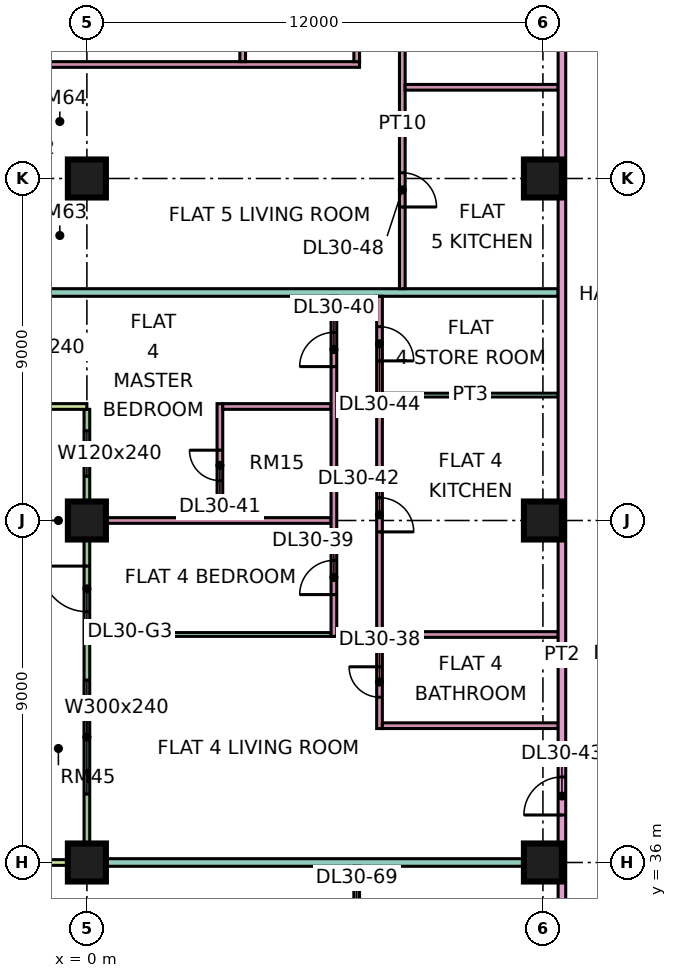
"""IFC4 building model, lengths in metres.
Left out: names, types, materials, properties, quantities, classifications, styles, units other than length and angle.
Written with IfcOpenShell. Run it as: python <this file> out.ifc"""

import sys

from ifc_helpers import new_model, si_unit, direction, frame, frame_2d, origin, origin_2d, place, context, subcontext, project, spatial, rectangle, extrude, element, fill, save


model = new_model("IFC4")
c1 = context("Model", 3, precision=1e-05, world=origin(), true_north=direction((0.0, 1.0)))
c2 = subcontext(c1, "Body", "Model", "MODEL_VIEW")
j1 = project(units=[si_unit("LENGTHUNIT", "METRE"), si_unit("PLANEANGLEUNIT", "RADIAN")], contexts=[c1])
p1 = place(None, origin())
s1 = spatial("IfcSite", under=j1, at=p1, CompositionType="ELEMENT")
p2 = place(p1, origin())
s2 = spatial("IfcBuilding", under=s1, at=p2, CompositionType="ELEMENT")
p3 = place(p2, frame((0.0, 0.0, 129.4)))
s3 = spatial("IfcBuildingStorey", under=s2, at=p3, CompositionType="ELEMENT", Elevation=129.4)
p4 = place(p3, frame((0.0, 36.0, 0.0), z_axis=(0.0, 0.0, 1.0), x_axis=(1.0, 0.0, 0.0)))
e1 = element("IfcColumn", 1, at=p4, inside=s3, PredefinedType="COLUMN", context=c2, shape_type="SweptSolid", body=[
    extrude(rectangle(XDim=1.0, YDim=1.0, at=origin_2d()), origin(), (0.0, 0.0, 1.0), 3.75),
])
for number, where, z_axis, x_axis in (
    (2, (0.0, 45.0, 0.0), (0.0, 0.0, 1.0), (1.0, 0.0, 0.0)),
    (3, (0.0, 54.0, 0.0), (0.0, 0.0, 1.0), (1.0, 0.0, 0.0)),
    (4, (12.0, 36.0, 0.0), (0.0, 0.0, 1.0), (1.0, 0.0, 0.0)),
    (5, (12.0, 45.0, 0.0), (0.0, 0.0, 1.0), (1.0, 0.0, 0.0)),
    (6, (12.0, 54.0, 0.0), (0.0, 0.0, 1.0), (1.0, 0.0, 0.0)),
):
    element("IfcColumn", number, at=place(p3, frame(where, z_axis=z_axis, x_axis=x_axis)), inside=s3, PredefinedType="COLUMN", context=c2, shape_type="SweptSolid", body=[
        extrude(rectangle(XDim=1.0, YDim=1.0, at=origin_2d()), origin(), (0.0, 0.0, 1.0), 3.75),
    ])
p5 = place(p3, frame((0.0, 47.925, 0.0), z_axis=(0.0, 0.0, 1.0), x_axis=(0.0, -1.0, 0.0)))
e7 = element("IfcWall", 7, at=p5, inside=s3, PredefinedType="SOLIDWALL", context=c2, shape_type="SweptSolid", body=[
    extrude(rectangle(XDim=11.85, YDim=0.15, at=frame_2d((5.925, 0.0))), origin(), (0.0, 0.0, 1.0), 3.35),
])
p6 = place(p5, frame((0.562, 0.0, 0.45)))
e8 = element("IfcOpeningElement", 8, at=p6, cuts=e7, PredefinedType="OPENING", context=c2, shape_type="SweptSolid", body=[
    extrude(rectangle(XDim=1.2, YDim=2.4, at=frame_2d((0.6, 1.2))), frame((0.0, 0.085, 0.0), z_axis=(0.0, -1.0, 0.0), x_axis=(1.0, 0.0, 0.0)), (0.0, 0.0, 1.0), 0.17),
])
p7 = place(p5, frame((4.125, 0.0, 0.0)))
e9 = element("IfcOpeningElement", 9, at=p7, cuts=e7, PredefinedType="OPENING", context=c2, shape_type="SweptSolid", body=[
    extrude(rectangle(XDim=1.2, YDim=2.4, at=frame_2d((0.6, 1.2))), frame((0.0, 0.085, 0.0), z_axis=(0.0, -1.0, 0.0), x_axis=(1.0, 0.0, 0.0)), (0.0, 0.0, 1.0), 0.17),
])
p8 = place(p5, frame((7.125, 0.0, 0.45)))
e10 = element("IfcOpeningElement", 10, at=p8, cuts=e7, PredefinedType="OPENING", context=c2, shape_type="SweptSolid", body=[
    extrude(rectangle(XDim=3.0, YDim=2.4, at=frame_2d((1.5, 1.2))), frame((0.0, 0.085, 0.0), z_axis=(0.0, -1.0, 0.0), x_axis=(1.0, 0.0, 0.0)), (0.0, 0.0, 1.0), 0.17),
])
for number, where, z_axis, x_axis in (
    (11, (-1.5, 48.0, 0.0), (0.0, 0.0, 1.0), (1.0, 0.0, 0.0)),
    (12, (-1.5, 36.0, 0.0), (0.0, 0.0, 1.0), (1.0, 0.0, 0.0)),
):
    element("IfcWall", number, at=place(p3, frame(where, z_axis=z_axis, x_axis=x_axis)), inside=s3, PredefinedType="SOLIDWALL", context=c2, shape_type="SweptSolid", body=[
        extrude(rectangle(XDim=1.5, YDim=0.15, at=frame_2d((0.75, 0.0))), origin(), (0.0, 0.0, 1.0), 3.35),
    ])
e13 = element("IfcWall", 13, at=p4, inside=s3, PredefinedType="PARTITIONING", context=c2, shape_type="SweptSolid", body=[
    extrude(rectangle(XDim=12.4, YDim=0.2, at=frame_2d((6.2, 0.0))), origin(), (0.0, 0.0, 1.0), 3.35),
])
p9 = place(p3, frame((-1.35, 51.0, 0.0), z_axis=(0.0, 0.0, 1.0), x_axis=(1.0, 0.0, 0.0)))
e14 = element("IfcWall", 14, at=p9, inside=s3, PredefinedType="PARTITIONING", context=c2, shape_type="SweptSolid", body=[
    extrude(rectangle(XDim=13.75, YDim=0.2, at=frame_2d((6.875, 0.0))), origin(), (0.0, 0.0, 1.0), 3.35),
])
p10 = place(p3, frame((-1.35, 57.0, 0.0), z_axis=(0.0, 0.0, 1.0), x_axis=(1.0, 0.0, 0.0)))
e15 = element("IfcWall", 15, at=p10, inside=s3, PredefinedType="PARTITIONING", context=c2, shape_type="SweptSolid", body=[
    extrude(rectangle(XDim=8.525, YDim=0.15, at=frame_2d((4.263, 0.0))), origin(), (0.0, 0.0, 1.0), 3.35),
])
p11 = place(p3, frame((0.074, 42.0, 0.0), z_axis=(0.0, 0.0, 1.0), x_axis=(1.0, 0.0, 0.0)))
e16 = element("IfcWall", 16, at=p11, inside=s3, PredefinedType="PARTITIONING", context=c2, shape_type="SweptSolid", body=[
    extrude(rectangle(XDim=6.351, YDim=0.1, at=frame_2d((3.176, 0.0))), origin(), (0.0, 0.0, 1.0), 3.35),
])
p12 = place(p3, frame((0.074, 45.0, 0.0), z_axis=(0.0, 0.0, 1.0), x_axis=(1.0, 0.0, 0.0)))
e17 = element("IfcWall", 17, at=p12, inside=s3, PredefinedType="PARTITIONING", context=c2, shape_type="SweptSolid", body=[
    extrude(rectangle(XDim=6.351, YDim=0.15, at=frame_2d((3.176, 0.0))), origin(), (0.0, 0.0, 1.0), 3.35),
])
p13 = place(p3, frame((3.5, 45.075, 0.0), z_axis=(0.0, 0.0, 1.0), x_axis=(0.0, 1.0, 0.0)))
e18 = element("IfcWall", 18, at=p13, inside=s3, PredefinedType="PARTITIONING", context=c2, shape_type="SweptSolid", body=[
    extrude(rectangle(XDim=3.0, YDim=0.15, at=frame_2d((1.5, 0.0))), origin(), (0.0, 0.0, 1.0), 3.35),
])
p14 = place(p13, frame((0.975, 0.0, 0.0)))
e19 = element("IfcOpeningElement", 19, at=p14, cuts=e18, PredefinedType="OPENING", context=c2, shape_type="SweptSolid", body=[
    extrude(rectangle(XDim=0.8, YDim=2.1, at=frame_2d((0.4, 1.05))), frame((0.0, 0.085, 0.0), z_axis=(0.0, -1.0, 0.0), x_axis=(1.0, 0.0, 0.0)), (0.0, 0.0, 1.0), 0.17),
])
p15 = place(p3, frame((3.575, 48.0, 0.0), z_axis=(0.0, 0.0, 1.0), x_axis=(1.0, 0.0, 0.0)))
e20 = element("IfcWall", 20, at=p15, inside=s3, PredefinedType="PARTITIONING", context=c2, shape_type="SweptSolid", body=[
    extrude(rectangle(XDim=2.85, YDim=0.15, at=frame_2d((1.425, 0.0))), origin(), (0.0, 0.0, 1.0), 3.35),
])
p16 = place(p3, frame((4.1, 57.075, 0.0), z_axis=(0.0, 0.0, 1.0), x_axis=(0.0, 1.0, 0.0)))
e21 = element("IfcWall", 21, at=p16, inside=s3, PredefinedType="PARTITIONING", context=c2, shape_type="SweptSolid", body=[
    extrude(rectangle(XDim=3.0, YDim=0.15, at=frame_2d((1.5, 0.0))), origin(), (0.0, 0.0, 1.0), 3.35),
])
p17 = place(p3, frame((6.5, 41.95, 0.0), z_axis=(0.0, 0.0, 1.0), x_axis=(0.0, 1.0, 0.0)))
e22 = element("IfcWall", 22, at=p17, inside=s3, PredefinedType="PARTITIONING", context=c2, shape_type="SweptSolid", body=[
    extrude(rectangle(XDim=8.95, YDim=0.15, at=frame_2d((4.475, 0.0))), origin(), (0.0, 0.0, 1.0), 3.35),
])
p18 = place(p17, frame((1.1, 0.0, 0.0)))
e23 = element("IfcOpeningElement", 23, at=p18, cuts=e22, PredefinedType="OPENING", context=c2, shape_type="SweptSolid", body=[
    extrude(rectangle(XDim=0.9, YDim=2.1, at=frame_2d((0.45, 1.05))), frame((0.0, 0.085, 0.0), z_axis=(0.0, -1.0, 0.0), x_axis=(1.0, 0.0, 0.0)), (0.0, 0.0, 1.0), 0.17),
])
p19 = place(p17, frame((7.1, 0.0, 0.0)))
e24 = element("IfcOpeningElement", 24, at=p19, cuts=e22, PredefinedType="OPENING", context=c2, shape_type="SweptSolid", body=[
    extrude(rectangle(XDim=0.9, YDim=2.1, at=frame_2d((0.45, 1.05))), frame((0.0, 0.085, 0.0), z_axis=(0.0, -1.0, 0.0), x_axis=(1.0, 0.0, 0.0)), (0.0, 0.0, 1.0), 0.17),
])
p20 = place(p3, frame((7.1, 26.925, 0.0), z_axis=(0.0, 0.0, 1.0), x_axis=(0.0, 1.0, 0.0)))
e25 = element("IfcWall", 25, at=p20, inside=s3, PredefinedType="PARTITIONING", context=c2, shape_type="SweptSolid", body=[
    extrude(rectangle(XDim=8.975, YDim=0.15, at=frame_2d((4.487, 0.0))), origin(), (0.0, 0.0, 1.0), 3.35),
])
p21 = place(p20, frame((7.125, 0.0, 0.0)))
e26 = element("IfcOpeningElement", 26, at=p21, cuts=e25, PredefinedType="OPENING", context=c2, shape_type="SweptSolid", body=[
    extrude(rectangle(XDim=0.9, YDim=2.1, at=frame_2d((0.45, 1.05))), frame((0.0, 0.085, 0.0), z_axis=(0.0, -1.0, 0.0), x_axis=(1.0, 0.0, 0.0)), (0.0, 0.0, 1.0), 0.17),
])
p22 = place(p20, frame((4.125, 0.0, 0.0)))
e27 = element("IfcOpeningElement", 27, at=p22, cuts=e25, PredefinedType="OPENING", context=c2, shape_type="SweptSolid", body=[
    extrude(rectangle(XDim=0.9, YDim=2.1, at=frame_2d((0.45, 1.05))), frame((0.0, 0.085, 0.0), z_axis=(0.0, -1.0, 0.0), x_axis=(1.0, 0.0, 0.0)), (0.0, 0.0, 1.0), 0.17),
])
p23 = place(p3, frame((7.1, 57.075, 0.0), z_axis=(0.0, 0.0, 1.0), x_axis=(0.0, 1.0, 0.0)))
e28 = element("IfcWall", 28, at=p23, inside=s3, PredefinedType="PARTITIONING", context=c2, shape_type="SweptSolid", body=[
    extrude(rectangle(XDim=7.275, YDim=0.15, at=frame_2d((3.638, 0.0))), origin(), (0.0, 0.0, 1.0), 3.35),
])
p24 = place(p23, frame((3.975, 0.0, 0.0)))
e29 = element("IfcOpeningElement", 29, at=p24, cuts=e28, PredefinedType="OPENING", context=c2, shape_type="SweptSolid", body=[
    extrude(rectangle(XDim=0.9, YDim=2.1, at=frame_2d((0.45, 1.05))), frame((0.0, 0.085, 0.0), z_axis=(0.0, -1.0, 0.0), x_axis=(1.0, 0.0, 0.0)), (0.0, 0.0, 1.0), 0.17),
])
p25 = place(p3, frame((7.7, 39.525, 0.0), z_axis=(0.0, 0.0, 1.0), x_axis=(0.0, 1.0, 0.0)))
e30 = element("IfcWall", 30, at=p25, inside=s3, PredefinedType="PARTITIONING", context=c2, shape_type="SweptSolid", body=[
    extrude(rectangle(XDim=11.375, YDim=0.15, at=frame_2d((5.688, 0.0))), origin(), (0.0, 0.0, 1.0), 3.35),
])
p26 = place(p25, frame((0.825, 0.0, 0.0)))
e31 = element("IfcOpeningElement", 31, at=p26, cuts=e30, PredefinedType="OPENING", context=c2, shape_type="SweptSolid", body=[
    extrude(rectangle(XDim=0.8, YDim=2.1, at=frame_2d((0.4, 1.05))), frame((0.0, 0.085, 0.0), z_axis=(0.0, -1.0, 0.0), x_axis=(1.0, 0.0, 0.0)), (0.0, 0.0, 1.0), 0.17),
])
p27 = place(p25, frame((5.175, 0.0, 0.0)))
e32 = element("IfcOpeningElement", 32, at=p27, cuts=e30, PredefinedType="OPENING", context=c2, shape_type="SweptSolid", body=[
    extrude(rectangle(XDim=0.9, YDim=2.1, at=frame_2d((0.45, 1.05))), frame((0.0, 0.085, 0.0), z_axis=(0.0, -1.0, 0.0), x_axis=(1.0, 0.0, 0.0)), (0.0, 0.0, 1.0), 0.17),
])
p28 = place(p25, frame((9.675, 0.0, 0.0)))
e33 = element("IfcOpeningElement", 33, at=p28, cuts=e30, PredefinedType="OPENING", context=c2, shape_type="SweptSolid", body=[
    extrude(rectangle(XDim=0.9, YDim=2.1, at=frame_2d((0.45, 1.05))), frame((0.0, 0.085, 0.0), z_axis=(0.0, -1.0, 0.0), x_axis=(1.0, 0.0, 0.0)), (0.0, 0.0, 1.0), 0.17),
])
for number, where, z_axis, x_axis in (
    (34, (7.775, 39.6, 0.0), (0.0, 0.0, 1.0), (1.0, 0.0, 0.0)),
    (35, (7.775, 42.0, 0.0), (0.0, 0.0, 1.0), (1.0, 0.0, 0.0)),
):
    element("IfcWall", number, at=place(p3, frame(where, z_axis=z_axis, x_axis=x_axis)), inside=s3, PredefinedType="PARTITIONING", context=c2, shape_type="SweptSolid", body=[
        extrude(rectangle(XDim=4.625, YDim=0.15, at=frame_2d((2.312, 0.0))), origin(), (0.0, 0.0, 1.0), 3.35),
    ])
p29 = place(p3, frame((7.775, 48.3, 0.0), z_axis=(0.0, 0.0, 1.0), x_axis=(1.0, 0.0, 0.0)))
e36 = element("IfcWall", 36, at=p29, inside=s3, PredefinedType="PARTITIONING", context=c2, shape_type="SweptSolid", body=[
    extrude(rectangle(XDim=4.625, YDim=0.1, at=frame_2d((2.312, 0.0))), origin(), (0.0, 0.0, 1.0), 3.35),
])
p30 = place(p3, frame((8.3, 51.1, 0.0), z_axis=(0.0, 0.0, 1.0), x_axis=(0.0, 1.0, 0.0)))
e37 = element("IfcWall", 37, at=p30, inside=s3, PredefinedType="PARTITIONING", context=c2, shape_type="SweptSolid", body=[
    extrude(rectangle(XDim=8.675, YDim=0.15, at=frame_2d((4.337, 0.0))), origin(), (0.0, 0.0, 1.0), 3.35),
])
p31 = place(p30, frame((2.15, 0.0, 0.0)))
e38 = element("IfcOpeningElement", 38, at=p31, cuts=e37, PredefinedType="OPENING", context=c2, shape_type="SweptSolid", body=[
    extrude(rectangle(XDim=0.9, YDim=2.1, at=frame_2d((0.45, 1.05))), frame((0.0, 0.085, 0.0), z_axis=(0.0, -1.0, 0.0), x_axis=(1.0, 0.0, 0.0)), (0.0, 0.0, 1.0), 0.17),
])
p32 = place(p3, frame((8.375, 56.4, 0.0), z_axis=(0.0, 0.0, 1.0), x_axis=(1.0, 0.0, 0.0)))
e39 = element("IfcWall", 39, at=p32, inside=s3, PredefinedType="PARTITIONING", context=c2, shape_type="SweptSolid", body=[
    extrude(rectangle(XDim=4.025, YDim=0.15, at=frame_2d((2.012, 0.0))), origin(), (0.0, 0.0, 1.0), 3.35),
])
p33 = place(p3, frame((12.5, 20.0, 0.0), z_axis=(0.0, 0.0, 1.0), x_axis=(0.0, 1.0, 0.0)))
e40 = element("IfcWall", 40, at=p33, inside=s3, PredefinedType="PARTITIONING", context=c2, shape_type="SweptSolid", body=[
    extrude(rectangle(XDim=42.926, YDim=0.2, at=frame_2d((21.463, 0.0))), origin(), (0.0, 0.0, 1.0), 3.35),
])
p34 = place(p33, frame((17.25, 0.0, 0.0)))
e41 = element("IfcOpeningElement", 41, at=p34, cuts=e40, PredefinedType="OPENING", context=c2, shape_type="SweptSolid", body=[
    extrude(rectangle(XDim=1.0, YDim=2.1, at=frame_2d((0.5, 1.05))), frame((0.0, 0.11, 0.0), z_axis=(0.0, -1.0, 0.0), x_axis=(1.0, 0.0, 0.0)), (0.0, 0.0, 1.0), 0.22),
])
p35 = place(p33, frame((40.8, 0.0, 0.0)))
e42 = element("IfcOpeningElement", 42, at=p35, cuts=e40, PredefinedType="OPENING", context=c2, shape_type="SweptSolid", body=[
    extrude(rectangle(XDim=1.0, YDim=2.1, at=frame_2d((0.5, 1.05))), frame((0.0, 0.11, 0.0), z_axis=(0.0, -1.0, 0.0), x_axis=(1.0, 0.0, 0.0)), (0.0, 0.0, 1.0), 0.22),
])
p36 = place(p33, frame((0.6, 0.0, 0.0)))
e43 = element("IfcOpeningElement", 43, at=p36, cuts=e40, PredefinedType="OPENING", context=c2, shape_type="SweptSolid", body=[
    extrude(rectangle(XDim=1.2, YDim=2.1, at=frame_2d((0.6, 1.05))), frame((0.0, 0.11, 0.0), z_axis=(0.0, -1.0, 0.0), x_axis=(1.0, 0.0, 0.0)), (0.0, 0.0, 1.0), 0.22),
])
p37 = place(p33, frame((13.65, 0.0, 0.0)))
e44 = element("IfcOpeningElement", 44, at=p37, cuts=e40, PredefinedType="OPENING", context=c2, shape_type="SweptSolid", body=[
    extrude(rectangle(XDim=1.0, YDim=2.1, at=frame_2d((0.5, 1.05))), frame((0.0, 0.11, 0.0), z_axis=(0.0, -1.0, 0.0), x_axis=(1.0, 0.0, 0.0)), (0.0, 0.0, 1.0), 0.22),
])
p38 = place(p6, origin())
e45 = element("IfcWindow", 45, at=p38, inside=s3, PartitioningType="SINGLE_PANEL", PredefinedType="WINDOW", context=c2, shape_type="SweptSolid", body=[
    extrude(rectangle(XDim=1.2, YDim=2.4, at=frame_2d((0.6, 1.2))), frame((0.0, 0.03, 0.0), z_axis=(0.0, -1.0, 0.0), x_axis=(1.0, 0.0, 0.0)), (0.0, 0.0, 1.0), 0.06),
])
fill(e8, e45)
p39 = place(p7, frame((1.2, 0.0, 0.0), z_axis=(0.0, 0.0, 1.0), x_axis=(-1.0, 0.0, 0.0)))
e46 = element("IfcDoor", 46, at=p39, inside=s3, OperationType="DOUBLE_DOOR_SINGLE_SWING", PredefinedType="DOOR", context=c2, shape_type="SweptSolid", body=[
    extrude(rectangle(XDim=1.2, YDim=2.4, at=frame_2d((0.6, 1.2))), frame((0.0, 0.025, 0.0), z_axis=(0.0, -1.0, 0.0), x_axis=(1.0, 0.0, 0.0)), (0.0, 0.0, 1.0), 0.05),
])
fill(e9, e46)
p40 = place(p8, origin())
e47 = element("IfcWindow", 47, at=p40, inside=s3, PartitioningType="SINGLE_PANEL", PredefinedType="WINDOW", context=c2, shape_type="SweptSolid", body=[
    extrude(rectangle(XDim=3.0, YDim=2.4, at=frame_2d((1.5, 1.2))), frame((0.0, 0.03, 0.0), z_axis=(0.0, -1.0, 0.0), x_axis=(1.0, 0.0, 0.0)), (0.0, 0.0, 1.0), 0.06),
])
fill(e10, e47)
p41 = place(p26, frame((0.8, 0.0, 0.0), z_axis=(0.0, 0.0, 1.0), x_axis=(-1.0, 0.0, 0.0)))
e48 = element("IfcDoor", 48, at=p41, inside=s3, OperationType="SINGLE_SWING_RIGHT", PredefinedType="DOOR", context=c2, shape_type="SweptSolid", body=[
    extrude(rectangle(XDim=0.8, YDim=2.1, at=frame_2d((0.4, 1.05))), frame((0.0, 0.025, 0.0), z_axis=(0.0, -1.0, 0.0), x_axis=(1.0, 0.0, 0.0)), (0.0, 0.0, 1.0), 0.05),
])
fill(e31, e48)
p42 = place(p18, origin())
e49 = element("IfcDoor", 49, at=p42, inside=s3, OperationType="SINGLE_SWING_LEFT", PredefinedType="DOOR", context=c2, shape_type="SweptSolid", body=[
    extrude(rectangle(XDim=0.9, YDim=2.1, at=frame_2d((0.45, 1.05))), frame((0.0, 0.025, 0.0), z_axis=(0.0, -1.0, 0.0), x_axis=(1.0, 0.0, 0.0)), (0.0, 0.0, 1.0), 0.05),
])
fill(e23, e49)
p43 = place(p19, origin())
e50 = element("IfcDoor", 50, at=p43, inside=s3, OperationType="SINGLE_SWING_LEFT", PredefinedType="DOOR", context=c2, shape_type="SweptSolid", body=[
    extrude(rectangle(XDim=0.9, YDim=2.1, at=frame_2d((0.45, 1.05))), frame((0.0, 0.025, 0.0), z_axis=(0.0, -1.0, 0.0), x_axis=(1.0, 0.0, 0.0)), (0.0, 0.0, 1.0), 0.05),
])
fill(e24, e50)
p44 = place(p14, frame((0.8, 0.0, 0.0), z_axis=(0.0, 0.0, 1.0), x_axis=(-1.0, 0.0, 0.0)))
e51 = element("IfcDoor", 51, at=p44, inside=s3, OperationType="SINGLE_SWING_RIGHT", PredefinedType="DOOR", context=c2, shape_type="SweptSolid", body=[
    extrude(rectangle(XDim=0.8, YDim=2.1, at=frame_2d((0.4, 1.05))), frame((0.0, 0.025, 0.0), z_axis=(0.0, -1.0, 0.0), x_axis=(1.0, 0.0, 0.0)), (0.0, 0.0, 1.0), 0.05),
])
fill(e19, e51)
p45 = place(p27, frame((0.9, 0.0, 0.0), z_axis=(0.0, 0.0, 1.0), x_axis=(-1.0, 0.0, 0.0)))
e52 = element("IfcDoor", 52, at=p45, inside=s3, OperationType="SINGLE_SWING_LEFT", PredefinedType="DOOR", context=c2, shape_type="SweptSolid", body=[
    extrude(rectangle(XDim=0.9, YDim=2.1, at=frame_2d((0.45, 1.05))), frame((0.0, 0.025, 0.0), z_axis=(0.0, -1.0, 0.0), x_axis=(1.0, 0.0, 0.0)), (0.0, 0.0, 1.0), 0.05),
])
fill(e32, e52)
p46 = place(p34, origin())
e53 = element("IfcDoor", 53, at=p46, inside=s3, OperationType="SINGLE_SWING_LEFT", PredefinedType="DOOR", context=c2, shape_type="SweptSolid", body=[
    extrude(rectangle(XDim=1.0, YDim=2.1, at=frame_2d((0.5, 1.05))), frame((0.0, 0.025, 0.0), z_axis=(0.0, -1.0, 0.0), x_axis=(1.0, 0.0, 0.0)), (0.0, 0.0, 1.0), 0.05),
])
fill(e41, e53)
p47 = place(p28, frame((0.9, 0.0, 0.0), z_axis=(0.0, 0.0, 1.0), x_axis=(-1.0, 0.0, 0.0)))
e54 = element("IfcDoor", 54, at=p47, inside=s3, OperationType="SINGLE_SWING_LEFT", PredefinedType="DOOR", context=c2, shape_type="SweptSolid", body=[
    extrude(rectangle(XDim=0.9, YDim=2.1, at=frame_2d((0.45, 1.05))), frame((0.0, 0.025, 0.0), z_axis=(0.0, -1.0, 0.0), x_axis=(1.0, 0.0, 0.0)), (0.0, 0.0, 1.0), 0.05),
])
fill(e33, e54)
p48 = place(p31, frame((0.9, 0.0, 0.0), z_axis=(0.0, 0.0, 1.0), x_axis=(-1.0, 0.0, 0.0)))
e55 = element("IfcDoor", 55, at=p48, inside=s3, OperationType="SINGLE_SWING_LEFT", PredefinedType="DOOR", context=c2, shape_type="SweptSolid", body=[
    extrude(rectangle(XDim=0.9, YDim=2.1, at=frame_2d((0.45, 1.05))), frame((0.0, 0.025, 0.0), z_axis=(0.0, -1.0, 0.0), x_axis=(1.0, 0.0, 0.0)), (0.0, 0.0, 1.0), 0.05),
])
fill(e38, e55)
save(model, sys.argv[1])
